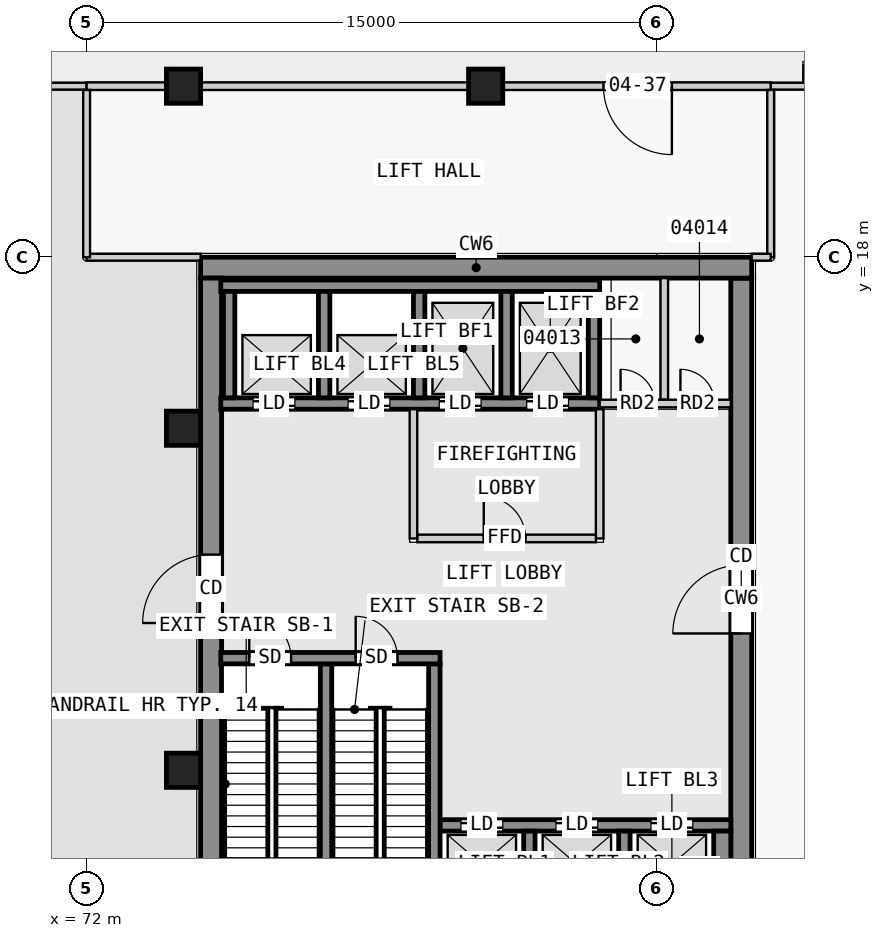
"""IFC4 building model, lengths in metres.
Left out: names, types, materials, properties, quantities, classifications, styles, units other than length and angle.
Written with IfcOpenShell. Run it as: python <this file> out.ifc"""

import sys

from ifc_helpers import new_model, si_unit, direction, frame, frame_2d, origin, origin_2d, place, context, subcontext, project, spatial, rectangle, extrude, element, fill, save


model = new_model("IFC4")
c1 = context("Model", 3, precision=1e-05, world=origin(), true_north=direction((0.0, 1.0)))
c2 = subcontext(c1, "Body", "Model", "MODEL_VIEW")
j1 = project(units=[si_unit("LENGTHUNIT", "METRE"), si_unit("PLANEANGLEUNIT", "RADIAN")], contexts=[c1])
p1 = place(None, origin())
s1 = spatial("IfcSite", under=j1, at=p1, CompositionType="ELEMENT")
p2 = place(p1, origin())
s2 = spatial("IfcBuilding", under=s1, at=p2, CompositionType="ELEMENT")
p3 = place(p2, frame((0.0, 0.0, 21.8)))
s3 = spatial("IfcBuildingStorey", under=s2, at=p3, CompositionType="ELEMENT", Elevation=21.8)
for number, where, z_axis, x_axis in (
    (1, (82.5, 22.5, 0.0), (0.0, 0.0, 1.0), (1.0, 0.0, 0.0)),
    (2, (74.55, 22.5, 0.0), (0.0, 0.0, 1.0), (1.0, 0.0, 0.0)),
    (3, (74.55, 13.5, 0.0), (0.0, 0.0, 1.0), (1.0, 0.0, 0.0)),
    (4, (74.55, 4.5, 0.0), (0.0, 0.0, 1.0), (1.0, 0.0, 0.0)),
):
    element("IfcColumn", number, at=place(p3, frame(where, z_axis=z_axis, x_axis=x_axis)), inside=s3, PredefinedType="COLUMN", context=c2, shape_type="SweptSolid", body=[
        extrude(rectangle(XDim=0.9, YDim=0.9, at=origin_2d()), origin(), (0.0, 0.0, 1.0), 5.0),
    ])
p4 = place(p3, frame((75.0, 17.725, 0.0), z_axis=(0.0, 0.0, 1.0), x_axis=(1.0, 0.0, 0.0)))
e5 = element("IfcWall", 5, at=p4, inside=s3, PredefinedType="SHEAR", context=c2, shape_type="SweptSolid", body=[
    extrude(rectangle(XDim=14.5, YDim=0.55, at=frame_2d((7.25, 0.0))), origin(), (0.0, 0.0, 1.0), 4.5),
])
p5 = place(p3, frame((75.275, 0.55, 0.0), z_axis=(0.0, 0.0, 1.0), x_axis=(0.0, 1.0, 0.0)))
e6 = element("IfcWall", 6, at=p5, inside=s3, PredefinedType="SHEAR", context=c2, shape_type="SweptSolid", body=[
    extrude(rectangle(XDim=16.9, YDim=0.55, at=frame_2d((8.45, 0.0))), origin(), (0.0, 0.0, 1.0), 4.5),
])
p6 = place(p5, frame((7.825, 0.0, 0.0)))
e7 = element("IfcOpeningElement", 7, at=p6, cuts=e6, PredefinedType="OPENING", context=c2, shape_type="SweptSolid", body=[
    extrude(rectangle(XDim=1.8, YDim=2.1, at=frame_2d((0.9, 1.05))), frame((0.0, 0.285, 0.0), z_axis=(0.0, -1.0, 0.0), x_axis=(1.0, 0.0, 0.0)), (0.0, 0.0, 1.0), 0.57),
])
p7 = place(p3, frame((89.225, 0.55, 0.0), z_axis=(0.0, 0.0, 1.0), x_axis=(0.0, 1.0, 0.0)))
e8 = element("IfcWall", 8, at=p7, inside=s3, PredefinedType="SHEAR", context=c2, shape_type="SweptSolid", body=[
    extrude(rectangle(XDim=16.9, YDim=0.55, at=frame_2d((8.45, 0.0))), origin(), (0.0, 0.0, 1.0), 4.5),
])
p8 = place(p7, frame((7.55, 0.0, 0.0)))
e9 = element("IfcOpeningElement", 9, at=p8, cuts=e8, PredefinedType="OPENING", context=c2, shape_type="SweptSolid", body=[
    extrude(rectangle(XDim=1.8, YDim=2.1, at=frame_2d((0.9, 1.05))), frame((0.0, 0.285, 0.0), z_axis=(0.0, -1.0, 0.0), x_axis=(1.0, 0.0, 0.0)), (0.0, 0.0, 1.0), 0.57),
])
p9 = place(p3, frame((75.53, 7.45, 0.0), z_axis=(0.0, 0.0, 1.0), x_axis=(1.0, 0.0, 0.0)))
e10 = element("IfcWall", 10, at=p9, inside=s3, PredefinedType="SHEAR", context=c2, shape_type="SweptSolid", body=[
    extrude(rectangle(XDim=5.77, YDim=0.3, at=frame_2d((2.885, 0.0))), origin(), (0.0, 0.0, 1.0), 4.5),
])
p10 = place(p9, frame((0.75, 0.0, 0.0)))
e11 = element("IfcOpeningElement", 11, at=p10, cuts=e10, PredefinedType="OPENING", context=c2, shape_type="SweptSolid", body=[
    extrude(rectangle(XDim=1.1, YDim=2.1, at=frame_2d((0.55, 1.05))), frame((0.0, 0.16, 0.0), z_axis=(0.0, -1.0, 0.0), x_axis=(1.0, 0.0, 0.0)), (0.0, 0.0, 1.0), 0.32),
])
p11 = place(p9, frame((3.55, 0.0, 0.0)))
e12 = element("IfcOpeningElement", 12, at=p11, cuts=e10, PredefinedType="OPENING", context=c2, shape_type="SweptSolid", body=[
    extrude(rectangle(XDim=1.1, YDim=2.1, at=frame_2d((0.55, 1.05))), frame((0.0, 0.16, 0.0), z_axis=(0.0, -1.0, 0.0), x_axis=(1.0, 0.0, 0.0)), (0.0, 0.0, 1.0), 0.32),
])
for number, where, z_axis, x_axis in (
    (13, (78.3, 0.9, 0.0), (0.0, 0.0, 1.0), (0.0, 1.0, 0.0)),
    (14, (81.15, 0.9, 0.0), (0.0, 0.0, 1.0), (0.0, 1.0, 0.0)),
):
    element("IfcWall", number, at=place(p3, frame(where, z_axis=z_axis, x_axis=x_axis)), inside=s3, PredefinedType="SHEAR", context=c2, shape_type="SweptSolid", body=[
        extrude(rectangle(XDim=6.4, YDim=0.3, at=frame_2d((3.2, 0.0))), origin(), (0.0, 0.0, 1.0), 4.5),
    ])
for number, where, z_axis, x_axis in (
    (15, (83.65, 0.9, 0.0), (0.0, 0.0, 1.0), (0.0, 1.0, 0.0)),
    (16, (86.15, 0.9, 0.0), (0.0, 0.0, 1.0), (0.0, 1.0, 0.0)),
):
    element("IfcWall", number, at=place(p3, frame(where, z_axis=z_axis, x_axis=x_axis)), inside=s3, PredefinedType="SHEAR", context=c2, shape_type="SweptSolid", body=[
        extrude(rectangle(XDim=2.0, YDim=0.3, at=frame_2d((1.0, 0.0))), origin(), (0.0, 0.0, 1.0), 4.5),
    ])
p12 = place(p3, frame((88.725, 0.9, 0.0), z_axis=(0.0, 0.0, 1.0), x_axis=(0.0, 1.0, 0.0)))
e17 = element("IfcWall", 17, at=p12, inside=s3, PredefinedType="SHEAR", context=c2, shape_type="SweptSolid", body=[
    extrude(rectangle(XDim=2.0, YDim=0.45, at=frame_2d((1.0, 0.0))), origin(), (0.0, 0.0, 1.0), 4.5),
])
p13 = place(p3, frame((81.3, 3.05, 0.0), z_axis=(0.0, 0.0, 1.0), x_axis=(1.0, 0.0, 0.0)))
e18 = element("IfcWall", 18, at=p13, inside=s3, PredefinedType="SHEAR", context=c2, shape_type="SweptSolid", body=[
    extrude(rectangle(XDim=7.65, YDim=0.3, at=frame_2d((3.825, 0.0))), origin(), (0.0, 0.0, 1.0), 4.5),
])
p14 = place(p13, frame((0.55, 0.0, 0.0)))
e19 = element("IfcOpeningElement", 19, at=p14, cuts=e18, PredefinedType="OPENING", context=c2, shape_type="SweptSolid", body=[
    extrude(rectangle(XDim=1.1, YDim=2.1, at=frame_2d((0.55, 1.05))), frame((0.0, 0.16, 0.0), z_axis=(0.0, -1.0, 0.0), x_axis=(1.0, 0.0, 0.0)), (0.0, 0.0, 1.0), 0.32),
])
p15 = place(p13, frame((3.05, 0.0, 0.0)))
e20 = element("IfcOpeningElement", 20, at=p15, cuts=e18, PredefinedType="OPENING", context=c2, shape_type="SweptSolid", body=[
    extrude(rectangle(XDim=1.1, YDim=2.1, at=frame_2d((0.55, 1.05))), frame((0.0, 0.16, 0.0), z_axis=(0.0, -1.0, 0.0), x_axis=(1.0, 0.0, 0.0)), (0.0, 0.0, 1.0), 0.32),
])
p16 = place(p13, frame((5.55, 0.0, 0.0)))
e21 = element("IfcOpeningElement", 21, at=p16, cuts=e18, PredefinedType="OPENING", context=c2, shape_type="SweptSolid", body=[
    extrude(rectangle(XDim=1.1, YDim=2.1, at=frame_2d((0.55, 1.05))), frame((0.0, 0.16, 0.0), z_axis=(0.0, -1.0, 0.0), x_axis=(1.0, 0.0, 0.0)), (0.0, 0.0, 1.0), 0.32),
])
p17 = place(p3, frame((75.53, 17.25, 0.0), z_axis=(0.0, 0.0, 1.0), x_axis=(1.0, 0.0, 0.0)))
e22 = element("IfcWall", 22, at=p17, inside=s3, PredefinedType="SHEAR", context=c2, shape_type="SweptSolid", body=[
    extrude(rectangle(XDim=9.97, YDim=0.3, at=frame_2d((4.985, 0.0))), origin(), (0.0, 0.0, 1.0), 4.5),
])
p18 = place(p3, frame((75.53, 14.15, 0.0), z_axis=(0.0, 0.0, 1.0), x_axis=(1.0, 0.0, 0.0)))
e23 = element("IfcWall", 23, at=p18, inside=s3, PredefinedType="SHEAR", context=c2, shape_type="SweptSolid", body=[
    extrude(rectangle(XDim=9.97, YDim=0.3, at=frame_2d((4.985, 0.0))), origin(), (0.0, 0.0, 1.0), 4.5),
])
p19 = place(p18, frame((0.85, 0.0, 0.0)))
e24 = element("IfcOpeningElement", 24, at=p19, cuts=e23, PredefinedType="OPENING", context=c2, shape_type="SweptSolid", body=[
    extrude(rectangle(XDim=1.1, YDim=2.1, at=frame_2d((0.55, 1.05))), frame((0.0, 0.16, 0.0), z_axis=(0.0, -1.0, 0.0), x_axis=(1.0, 0.0, 0.0)), (0.0, 0.0, 1.0), 0.32),
])
p20 = place(p18, frame((3.35, 0.0, 0.0)))
e25 = element("IfcOpeningElement", 25, at=p20, cuts=e23, PredefinedType="OPENING", context=c2, shape_type="SweptSolid", body=[
    extrude(rectangle(XDim=1.1, YDim=2.1, at=frame_2d((0.55, 1.05))), frame((0.0, 0.16, 0.0), z_axis=(0.0, -1.0, 0.0), x_axis=(1.0, 0.0, 0.0)), (0.0, 0.0, 1.0), 0.32),
])
p21 = place(p18, frame((5.75, 0.0, 0.0)))
e26 = element("IfcOpeningElement", 26, at=p21, cuts=e23, PredefinedType="OPENING", context=c2, shape_type="SweptSolid", body=[
    extrude(rectangle(XDim=1.1, YDim=2.1, at=frame_2d((0.55, 1.05))), frame((0.0, 0.16, 0.0), z_axis=(0.0, -1.0, 0.0), x_axis=(1.0, 0.0, 0.0)), (0.0, 0.0, 1.0), 0.32),
])
p22 = place(p18, frame((8.05, 0.0, 0.0)))
e27 = element("IfcOpeningElement", 27, at=p22, cuts=e23, PredefinedType="OPENING", context=c2, shape_type="SweptSolid", body=[
    extrude(rectangle(XDim=1.1, YDim=2.1, at=frame_2d((0.55, 1.05))), frame((0.0, 0.16, 0.0), z_axis=(0.0, -1.0, 0.0), x_axis=(1.0, 0.0, 0.0)), (0.0, 0.0, 1.0), 0.32),
])
for number, where, z_axis, x_axis in (
    (28, (75.75, 14.3, 0.0), (0.0, 0.0, 1.0), (0.0, 1.0, 0.0)),
    (29, (78.25, 14.3, 0.0), (0.0, 0.0, 1.0), (0.0, 1.0, 0.0)),
    (30, (80.75, 14.3, 0.0), (0.0, 0.0, 1.0), (0.0, 1.0, 0.0)),
    (31, (83.05, 14.3, 0.0), (0.0, 0.0, 1.0), (0.0, 1.0, 0.0)),
    (32, (85.35, 14.3, 0.0), (0.0, 0.0, 1.0), (0.0, 1.0, 0.0)),
):
    element("IfcWall", number, at=place(p3, frame(where, z_axis=z_axis, x_axis=x_axis)), inside=s3, PredefinedType="SHEAR", context=c2, shape_type="SweptSolid", body=[
        extrude(rectangle(XDim=2.8, YDim=0.3, at=frame_2d((1.4, 0.0))), origin(), (0.0, 0.0, 1.0), 4.5),
    ])
p23 = place(p3, frame((80.6, 10.6, 0.0), z_axis=(0.0, 0.0, 1.0), x_axis=(0.0, 1.0, 0.0)))
e33 = element("IfcWall", 33, at=p23, inside=s3, PredefinedType="PARTITIONING", context=c2, shape_type="SweptSolid", body=[
    extrude(rectangle(XDim=3.4, YDim=0.2, at=frame_2d((1.7, 0.0))), origin(), (0.0, 0.0, 1.0), 4.5),
])
p24 = place(p3, frame((80.7, 10.6, 0.0), z_axis=(0.0, 0.0, 1.0), x_axis=(1.0, 0.0, 0.0)))
e34 = element("IfcWall", 34, at=p24, inside=s3, PredefinedType="PARTITIONING", context=c2, shape_type="SweptSolid", body=[
    extrude(rectangle(XDim=4.7, YDim=0.2, at=frame_2d((2.35, 0.0))), origin(), (0.0, 0.0, 1.0), 4.5),
])
p25 = place(p24, frame((1.75, 0.0, 0.0)))
e35 = element("IfcOpeningElement", 35, at=p25, cuts=e34, PredefinedType="OPENING", context=c2, shape_type="SweptSolid", body=[
    extrude(rectangle(XDim=1.1, YDim=2.1, at=frame_2d((0.55, 1.05))), frame((0.0, 0.11, 0.0), z_axis=(0.0, -1.0, 0.0), x_axis=(1.0, 0.0, 0.0)), (0.0, 0.0, 1.0), 0.22),
])
p26 = place(p3, frame((85.5, 10.6, 0.0), z_axis=(0.0, 0.0, 1.0), x_axis=(0.0, 1.0, 0.0)))
e36 = element("IfcWall", 36, at=p26, inside=s3, PredefinedType="PARTITIONING", context=c2, shape_type="SweptSolid", body=[
    extrude(rectangle(XDim=3.4, YDim=0.2, at=frame_2d((1.7, 0.0))), origin(), (0.0, 0.0, 1.0), 4.5),
])
p27 = place(p3, frame((85.5, 14.15, 0.0), z_axis=(0.0, 0.0, 1.0), x_axis=(1.0, 0.0, 0.0)))
e37 = element("IfcWall", 37, at=p27, inside=s3, PredefinedType="PARTITIONING", context=c2, shape_type="SweptSolid", body=[
    extrude(rectangle(XDim=3.45, YDim=0.2, at=frame_2d((1.725, 0.0))), origin(), (0.0, 0.0, 1.0), 4.5),
])
p28 = place(p27, frame((0.55, 0.0, 0.0)))
e38 = element("IfcOpeningElement", 38, at=p28, cuts=e37, PredefinedType="OPENING", context=c2, shape_type="SweptSolid", body=[
    extrude(rectangle(XDim=0.9, YDim=2.1, at=frame_2d((0.45, 1.05))), frame((0.0, 0.11, 0.0), z_axis=(0.0, -1.0, 0.0), x_axis=(1.0, 0.0, 0.0)), (0.0, 0.0, 1.0), 0.22),
])
p29 = place(p27, frame((2.125, 0.0, 0.0)))
e39 = element("IfcOpeningElement", 39, at=p29, cuts=e37, PredefinedType="OPENING", context=c2, shape_type="SweptSolid", body=[
    extrude(rectangle(XDim=0.9, YDim=2.1, at=frame_2d((0.45, 1.05))), frame((0.0, 0.11, 0.0), z_axis=(0.0, -1.0, 0.0), x_axis=(1.0, 0.0, 0.0)), (0.0, 0.0, 1.0), 0.22),
])
p30 = place(p3, frame((87.2, 14.25, 0.0), z_axis=(0.0, 0.0, 1.0), x_axis=(0.0, 1.0, 0.0)))
e40 = element("IfcWall", 40, at=p30, inside=s3, PredefinedType="PARTITIONING", context=c2, shape_type="SweptSolid", body=[
    extrude(rectangle(XDim=3.2, YDim=0.2, at=frame_2d((1.6, 0.0))), origin(), (0.0, 0.0, 1.0), 4.5),
])
p31 = place(p3, frame((72.0, 22.5, 0.0), z_axis=(0.0, 0.0, 1.0), x_axis=(-1.0, 0.0, 0.0)))
e41 = element("IfcWall", 41, at=p31, inside=s3, PredefinedType="PARTITIONING", context=c2, shape_type="SweptSolid", body=[
    extrude(rectangle(XDim=27.0, YDim=0.18, at=frame_2d((13.5, 0.0))), origin(), (0.0, 0.0, 1.0), 4.5),
])
p32 = place(p3, frame((90.95, 23.05, 0.0), z_axis=(0.0, 0.0, 1.0), x_axis=(0.0, -1.0, 0.0)))
e42 = element("IfcWall", 42, at=p32, inside=s3, PredefinedType="PARTITIONING", context=c2, shape_type="SweptSolid", body=[
    extrude(rectangle(XDim=0.55, YDim=0.18, at=frame_2d((0.275, 0.0))), origin(), (0.0, 0.0, 1.0), 3.7),
])
p33 = place(p3, frame((90.95, 22.5, 0.0), z_axis=(0.0, 0.0, 1.0), x_axis=(-1.0, 0.0, 0.0)))
e43 = element("IfcWall", 43, at=p33, inside=s3, PredefinedType="PARTITIONING", context=c2, shape_type="SweptSolid", body=[
    extrude(rectangle(XDim=0.95, YDim=0.18, at=frame_2d((0.475, 0.0))), origin(), (0.0, 0.0, 1.0), 3.7),
])
p34 = place(p3, frame((90.0, 22.5, 0.0), z_axis=(0.0, 0.0, 1.0), x_axis=(-1.0, 0.0, 0.0)))
e44 = element("IfcWall", 44, at=p34, inside=s3, PredefinedType="PARTITIONING", context=c2, shape_type="SweptSolid", body=[
    extrude(rectangle(XDim=7.05, YDim=0.2, at=frame_2d((3.525, 0.0))), origin(), (0.0, 0.0, 1.0), 3.7),
])
p35 = place(p34, frame((2.6, 0.0, 0.0)))
e45 = element("IfcOpeningElement", 45, at=p35, cuts=e44, PredefinedType="OPENING", context=c2, shape_type="SweptSolid", body=[
    extrude(rectangle(XDim=1.8, YDim=2.1, at=frame_2d((0.9, 1.05))), frame((0.0, 0.11, 0.0), z_axis=(0.0, -1.0, 0.0), x_axis=(1.0, 0.0, 0.0)), (0.0, 0.0, 1.0), 0.22),
])
p36 = place(p3, frame((82.05, 22.5, 0.0), z_axis=(0.0, 0.0, 1.0), x_axis=(-1.0, 0.0, 0.0)))
e46 = element("IfcWall", 46, at=p36, inside=s3, PredefinedType="PARTITIONING", context=c2, shape_type="SweptSolid", body=[
    extrude(rectangle(XDim=7.05, YDim=0.2, at=frame_2d((3.525, 0.0))), origin(), (0.0, 0.0, 1.0), 4.5),
])
p37 = place(p3, frame((74.1, 22.5, 0.0), z_axis=(0.0, 0.0, 1.0), x_axis=(-1.0, 0.0, 0.0)))
e47 = element("IfcWall", 47, at=p37, inside=s3, PredefinedType="PARTITIONING", context=c2, shape_type="SweptSolid", body=[
    extrude(rectangle(XDim=2.1, YDim=0.2, at=frame_2d((1.05, 0.0))), origin(), (0.0, 0.0, 1.0), 4.5),
])
p38 = place(p3, frame((75.0, 18.0, 0.0), z_axis=(0.0, 0.0, 1.0), x_axis=(-1.0, 0.0, 0.0)))
e48 = element("IfcWall", 48, at=p38, inside=s3, PredefinedType="PARTITIONING", context=c2, shape_type="SweptSolid", body=[
    extrude(rectangle(XDim=3.0, YDim=0.18, at=frame_2d((1.5, 0.0))), origin(), (0.0, 0.0, 1.0), 3.7),
])
for number, where, z_axis, x_axis in (
    (49, (72.0, 18.0, 0.0), (0.0, 0.0, 1.0), (0.0, 1.0, 0.0)),
    (50, (90.0, 22.4, 0.0), (0.0, 0.0, 1.0), (0.0, -1.0, 0.0)),
):
    element("IfcWall", number, at=place(p3, frame(where, z_axis=z_axis, x_axis=x_axis)), inside=s3, PredefinedType="PARTITIONING", context=c2, shape_type="SweptSolid", body=[
        extrude(rectangle(XDim=4.4, YDim=0.18, at=frame_2d((2.2, 0.0))), origin(), (0.0, 0.0, 1.0), 4.5),
    ])
p39 = place(p3, frame((90.0, 18.0, 0.0), z_axis=(0.0, 0.0, 1.0), x_axis=(-1.0, 0.0, 0.0)))
e51 = element("IfcWall", 51, at=p39, inside=s3, PredefinedType="PARTITIONING", context=c2, shape_type="SweptSolid", body=[
    extrude(rectangle(XDim=0.5, YDim=0.18, at=frame_2d((0.25, 0.0))), origin(), (0.0, 0.0, 1.0), 4.5),
])
p40 = place(p25, origin())
e52 = element("IfcDoor", 52, at=p40, inside=s3, OperationType="SINGLE_SWING_LEFT", PredefinedType="DOOR", context=c2, shape_type="SweptSolid", body=[
    extrude(rectangle(XDim=1.1, YDim=2.1, at=frame_2d((0.55, 1.05))), frame((0.0, 0.025, 0.0), z_axis=(0.0, -1.0, 0.0), x_axis=(1.0, 0.0, 0.0)), (0.0, 0.0, 1.0), 0.05),
])
fill(e35, e52)
p41 = place(p14, origin())
e53 = element("IfcDoor", 53, at=p41, inside=s3, OperationType="DOUBLE_DOOR_SLIDING", PredefinedType="DOOR", context=c2, shape_type="SweptSolid", body=[
    extrude(rectangle(XDim=1.1, YDim=2.1, at=frame_2d((0.55, 1.05))), frame((0.0, 0.025, 0.0), z_axis=(0.0, -1.0, 0.0), x_axis=(1.0, 0.0, 0.0)), (0.0, 0.0, 1.0), 0.05),
])
fill(e19, e53)
p42 = place(p15, origin())
e54 = element("IfcDoor", 54, at=p42, inside=s3, OperationType="DOUBLE_DOOR_SLIDING", PredefinedType="DOOR", context=c2, shape_type="SweptSolid", body=[
    extrude(rectangle(XDim=1.1, YDim=2.1, at=frame_2d((0.55, 1.05))), frame((0.0, 0.025, 0.0), z_axis=(0.0, -1.0, 0.0), x_axis=(1.0, 0.0, 0.0)), (0.0, 0.0, 1.0), 0.05),
])
fill(e20, e54)
p43 = place(p16, origin())
e55 = element("IfcDoor", 55, at=p43, inside=s3, OperationType="DOUBLE_DOOR_SLIDING", PredefinedType="DOOR", context=c2, shape_type="SweptSolid", body=[
    extrude(rectangle(XDim=1.1, YDim=2.1, at=frame_2d((0.55, 1.05))), frame((0.0, 0.025, 0.0), z_axis=(0.0, -1.0, 0.0), x_axis=(1.0, 0.0, 0.0)), (0.0, 0.0, 1.0), 0.05),
])
fill(e21, e55)
p44 = place(p19, origin())
e56 = element("IfcDoor", 56, at=p44, inside=s3, OperationType="DOUBLE_DOOR_SLIDING", PredefinedType="DOOR", context=c2, shape_type="SweptSolid", body=[
    extrude(rectangle(XDim=1.1, YDim=2.1, at=frame_2d((0.55, 1.05))), frame((0.0, 0.025, 0.0), z_axis=(0.0, -1.0, 0.0), x_axis=(1.0, 0.0, 0.0)), (0.0, 0.0, 1.0), 0.05),
])
fill(e24, e56)
p45 = place(p20, origin())
e57 = element("IfcDoor", 57, at=p45, inside=s3, OperationType="DOUBLE_DOOR_SLIDING", PredefinedType="DOOR", context=c2, shape_type="SweptSolid", body=[
    extrude(rectangle(XDim=1.1, YDim=2.1, at=frame_2d((0.55, 1.05))), frame((0.0, 0.025, 0.0), z_axis=(0.0, -1.0, 0.0), x_axis=(1.0, 0.0, 0.0)), (0.0, 0.0, 1.0), 0.05),
])
fill(e25, e57)
p46 = place(p21, origin())
e58 = element("IfcDoor", 58, at=p46, inside=s3, OperationType="DOUBLE_DOOR_SLIDING", PredefinedType="DOOR", context=c2, shape_type="SweptSolid", body=[
    extrude(rectangle(XDim=1.1, YDim=2.1, at=frame_2d((0.55, 1.05))), frame((0.0, 0.025, 0.0), z_axis=(0.0, -1.0, 0.0), x_axis=(1.0, 0.0, 0.0)), (0.0, 0.0, 1.0), 0.05),
])
fill(e26, e58)
p47 = place(p22, origin())
e59 = element("IfcDoor", 59, at=p47, inside=s3, OperationType="DOUBLE_DOOR_SLIDING", PredefinedType="DOOR", context=c2, shape_type="SweptSolid", body=[
    extrude(rectangle(XDim=1.1, YDim=2.1, at=frame_2d((0.55, 1.05))), frame((0.0, 0.025, 0.0), z_axis=(0.0, -1.0, 0.0), x_axis=(1.0, 0.0, 0.0)), (0.0, 0.0, 1.0), 0.05),
])
fill(e27, e59)
p48 = place(p10, origin())
e60 = element("IfcDoor", 60, at=p48, inside=s3, OperationType="SINGLE_SWING_RIGHT", PredefinedType="DOOR", context=c2, shape_type="SweptSolid", body=[
    extrude(rectangle(XDim=1.1, YDim=2.1, at=frame_2d((0.55, 1.05))), frame((0.0, 0.025, 0.0), z_axis=(0.0, -1.0, 0.0), x_axis=(1.0, 0.0, 0.0)), (0.0, 0.0, 1.0), 0.05),
])
fill(e11, e60)
p49 = place(p11, origin())
e61 = element("IfcDoor", 61, at=p49, inside=s3, OperationType="SINGLE_SWING_LEFT", PredefinedType="DOOR", context=c2, shape_type="SweptSolid", body=[
    extrude(rectangle(XDim=1.1, YDim=2.1, at=frame_2d((0.55, 1.05))), frame((0.0, 0.025, 0.0), z_axis=(0.0, -1.0, 0.0), x_axis=(1.0, 0.0, 0.0)), (0.0, 0.0, 1.0), 0.05),
])
fill(e12, e61)
p50 = place(p6, origin())
e62 = element("IfcDoor", 62, at=p50, inside=s3, OperationType="DOUBLE_DOOR_SINGLE_SWING", PredefinedType="DOOR", context=c2, shape_type="SweptSolid", body=[
    extrude(rectangle(XDim=1.8, YDim=2.1, at=frame_2d((0.9, 1.05))), frame((0.0, 0.025, 0.0), z_axis=(0.0, -1.0, 0.0), x_axis=(1.0, 0.0, 0.0)), (0.0, 0.0, 1.0), 0.05),
])
fill(e7, e62)
p51 = place(p8, origin())
e63 = element("IfcDoor", 63, at=p51, inside=s3, OperationType="DOUBLE_DOOR_SINGLE_SWING", PredefinedType="DOOR", context=c2, shape_type="SweptSolid", body=[
    extrude(rectangle(XDim=1.8, YDim=2.1, at=frame_2d((0.9, 1.05))), frame((0.0, 0.025, 0.0), z_axis=(0.0, -1.0, 0.0), x_axis=(1.0, 0.0, 0.0)), (0.0, 0.0, 1.0), 0.05),
])
fill(e9, e63)
p52 = place(p28, origin())
e64 = element("IfcDoor", 64, at=p52, inside=s3, OperationType="SINGLE_SWING_LEFT", PredefinedType="DOOR", context=c2, shape_type="SweptSolid", body=[
    extrude(rectangle(XDim=0.9, YDim=2.1, at=frame_2d((0.45, 1.05))), frame((0.0, 0.025, 0.0), z_axis=(0.0, -1.0, 0.0), x_axis=(1.0, 0.0, 0.0)), (0.0, 0.0, 1.0), 0.05),
])
fill(e38, e64)
p53 = place(p29, origin())
e65 = element("IfcDoor", 65, at=p53, inside=s3, OperationType="SINGLE_SWING_LEFT", PredefinedType="DOOR", context=c2, shape_type="SweptSolid", body=[
    extrude(rectangle(XDim=0.9, YDim=2.1, at=frame_2d((0.45, 1.05))), frame((0.0, 0.025, 0.0), z_axis=(0.0, -1.0, 0.0), x_axis=(1.0, 0.0, 0.0)), (0.0, 0.0, 1.0), 0.05),
])
fill(e39, e65)
p54 = place(p35, origin())
e66 = element("IfcDoor", 66, at=p54, inside=s3, OperationType="DOUBLE_DOOR_SINGLE_SWING", PredefinedType="DOOR", context=c2, shape_type="SweptSolid", body=[
    extrude(rectangle(XDim=1.8, YDim=2.1, at=frame_2d((0.9, 1.05))), frame((0.0, 0.025, 0.0), z_axis=(0.0, -1.0, 0.0), x_axis=(1.0, 0.0, 0.0)), (0.0, 0.0, 1.0), 0.05),
])
fill(e45, e66)
save(model, sys.argv[1])
